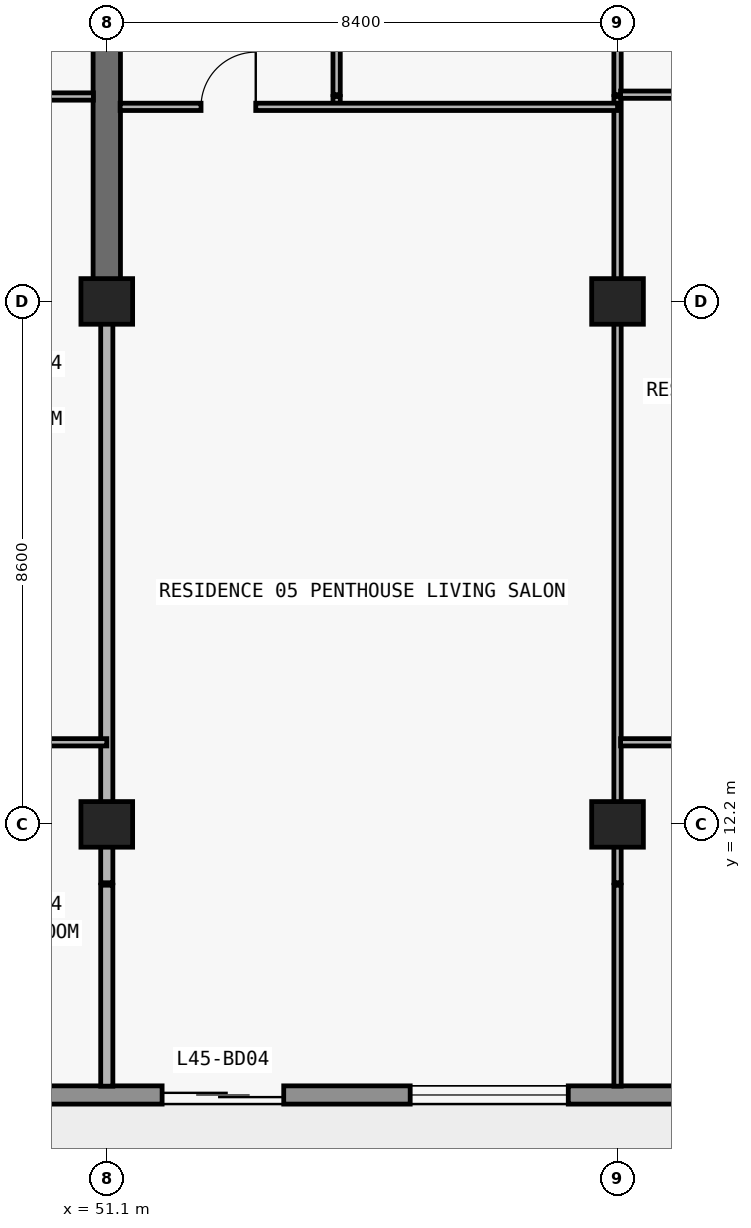
"""IFC4 building model, lengths in metres.
Left out: names, types, materials, properties, quantities, classifications, styles, units other than length and angle.
Written with IfcOpenShell. Run it as: python <this file> out.ifc"""

import sys

from ifc_helpers import new_model, si_unit, direction, frame, frame_2d, origin, origin_2d, place, context, subcontext, project, spatial, rectangle, extrude, element, fill, save


model = new_model("IFC4")
c1 = context("Model", 3, precision=1e-05, world=origin(), true_north=direction((0.0, 1.0)))
c2 = subcontext(c1, "Body", "Model", "MODEL_VIEW")
j1 = project(units=[si_unit("LENGTHUNIT", "METRE"), si_unit("PLANEANGLEUNIT", "RADIAN")], contexts=[c1])
p1 = place(None, origin())
s1 = spatial("IfcSite", under=j1, at=p1, CompositionType="ELEMENT")
p2 = place(p1, origin())
s2 = spatial("IfcBuilding", under=s1, at=p2, CompositionType="ELEMENT")
p3 = place(p2, frame((0.0, 0.0, 163.8)))
s3 = spatial("IfcBuildingStorey", under=s2, at=p3, CompositionType="ELEMENT", Elevation=163.8)
for number, where, z_axis, x_axis in (
    (1, (51.1, 12.2, 0.0), (0.0, 0.0, 1.0), (1.0, 0.0, 0.0)),
    (2, (59.5, 12.2, 0.0), (0.0, 0.0, 1.0), (1.0, 0.0, 0.0)),
    (3, (51.1, 20.8, 0.0), (0.0, 0.0, 1.0), (1.0, 0.0, 0.0)),
    (4, (59.5, 20.8, 0.0), (0.0, 0.0, 1.0), (1.0, 0.0, 0.0)),
):
    element("IfcColumn", number, at=place(p3, frame(where, z_axis=z_axis, x_axis=x_axis)), inside=s3, PredefinedType="COLUMN", context=c2, shape_type="SweptSolid", body=[
        extrude(rectangle(XDim=0.85, YDim=0.75, at=origin_2d()), origin(), (0.0, 0.0, 1.0), 3.05),
    ])
p4 = place(p3, frame((51.1, 20.8, 0.0), z_axis=(0.0, 0.0, 1.0), x_axis=(0.0, 1.0, 0.0)))
e5 = element("IfcWall", 5, at=p4, inside=s3, PredefinedType="SHEAR", context=c2, shape_type="SweptSolid", body=[
    extrude(rectangle(XDim=8.6, YDim=0.45, at=frame_2d((4.3, 0.0))), origin(), (0.0, 0.0, 1.0), 3.05),
])
p5 = place(p3, frame((67.7, 7.75, 0.0), z_axis=(0.0, 0.0, 1.0), x_axis=(-1.0, 0.0, 0.0)))
e6 = element("IfcWall", 6, at=p5, inside=s3, PredefinedType="STANDARD", context=c2, shape_type="SweptSolid", body=[
    extrude(rectangle(XDim=57.6, YDim=0.3, at=frame_2d((28.8, 0.0))), origin(), (0.0, 0.0, 1.0), 3.05),
])
p6 = place(p5, frame((54.69, 0.0, 0.0)))
e7 = element("IfcOpeningElement", 7, at=p6, cuts=e6, PredefinedType="OPENING", context=c2, shape_type="SweptSolid", body=[
    extrude(rectangle(XDim=2.0, YDim=2.3, at=frame_2d((1.0, 1.15))), frame((0.0, 0.16, 0.0), z_axis=(0.0, -1.0, 0.0), x_axis=(1.0, 0.0, 0.0)), (0.0, 0.0, 1.0), 0.32),
])
p7 = place(p5, frame((50.21, 0.0, 0.65)))
e8 = element("IfcOpeningElement", 8, at=p7, cuts=e6, PredefinedType="OPENING", context=c2, shape_type="SweptSolid", body=[
    extrude(rectangle(XDim=2.6, YDim=1.85, at=frame_2d((1.3, 0.925))), frame((0.0, 0.16, 0.0), z_axis=(0.0, -1.0, 0.0), x_axis=(1.0, 0.0, 0.0)), (0.0, 0.0, 1.0), 0.32),
])
p8 = place(p5, frame((44.1, 0.0, 0.85)))
e9 = element("IfcOpeningElement", 9, at=p8, cuts=e6, PredefinedType="OPENING", context=c2, shape_type="SweptSolid", body=[
    extrude(rectangle(XDim=2.2, YDim=1.55, at=frame_2d((1.1, 0.775))), frame((0.0, 0.16, 0.0), z_axis=(0.0, -1.0, 0.0), x_axis=(1.0, 0.0, 0.0)), (0.0, 0.0, 1.0), 0.32),
])
p9 = place(p5, frame((37.69, 0.0, 0.0)))
e10 = element("IfcOpeningElement", 10, at=p9, cuts=e6, PredefinedType="OPENING", context=c2, shape_type="SweptSolid", body=[
    extrude(rectangle(XDim=2.0, YDim=2.3, at=frame_2d((1.0, 1.15))), frame((0.0, 0.16, 0.0), z_axis=(0.0, -1.0, 0.0), x_axis=(1.0, 0.0, 0.0)), (0.0, 0.0, 1.0), 0.32),
])
p10 = place(p5, frame((33.59, 0.0, 0.85)))
e11 = element("IfcOpeningElement", 11, at=p10, cuts=e6, PredefinedType="OPENING", context=c2, shape_type="SweptSolid", body=[
    extrude(rectangle(XDim=1.8, YDim=1.55, at=frame_2d((0.9, 0.775))), frame((0.0, 0.16, 0.0), z_axis=(0.0, -1.0, 0.0), x_axis=(1.0, 0.0, 0.0)), (0.0, 0.0, 1.0), 0.32),
])
p11 = place(p5, frame((25.914, 0.0, 0.85)))
e12 = element("IfcOpeningElement", 12, at=p11, cuts=e6, PredefinedType="OPENING", context=c2, shape_type="SweptSolid", body=[
    extrude(rectangle(XDim=2.2, YDim=1.55, at=frame_2d((1.1, 0.775))), frame((0.0, 0.16, 0.0), z_axis=(0.0, -1.0, 0.0), x_axis=(1.0, 0.0, 0.0)), (0.0, 0.0, 1.0), 0.32),
])
p12 = place(p5, frame((21.69, 0.0, 0.0)))
e13 = element("IfcOpeningElement", 13, at=p12, cuts=e6, PredefinedType="OPENING", context=c2, shape_type="SweptSolid", body=[
    extrude(rectangle(XDim=2.0, YDim=2.3, at=frame_2d((1.0, 1.15))), frame((0.0, 0.16, 0.0), z_axis=(0.0, -1.0, 0.0), x_axis=(1.0, 0.0, 0.0)), (0.0, 0.0, 1.0), 0.32),
])
p13 = place(p5, frame((17.59, 0.0, 0.85)))
e14 = element("IfcOpeningElement", 14, at=p13, cuts=e6, PredefinedType="OPENING", context=c2, shape_type="SweptSolid", body=[
    extrude(rectangle(XDim=1.8, YDim=1.55, at=frame_2d((0.9, 0.775))), frame((0.0, 0.16, 0.0), z_axis=(0.0, -1.0, 0.0), x_axis=(1.0, 0.0, 0.0)), (0.0, 0.0, 1.0), 0.32),
])
p14 = place(p5, frame((13.69, 0.0, 0.0)))
e15 = element("IfcOpeningElement", 15, at=p14, cuts=e6, PredefinedType="OPENING", context=c2, shape_type="SweptSolid", body=[
    extrude(rectangle(XDim=2.0, YDim=2.3, at=frame_2d((1.0, 1.15))), frame((0.0, 0.16, 0.0), z_axis=(0.0, -1.0, 0.0), x_axis=(1.0, 0.0, 0.0)), (0.0, 0.0, 1.0), 0.32),
])
p15 = place(p5, frame((9.01, 0.0, 0.65)))
e16 = element("IfcOpeningElement", 16, at=p15, cuts=e6, PredefinedType="OPENING", context=c2, shape_type="SweptSolid", body=[
    extrude(rectangle(XDim=2.6, YDim=1.85, at=frame_2d((1.3, 0.925))), frame((0.0, 0.16, 0.0), z_axis=(0.0, -1.0, 0.0), x_axis=(1.0, 0.0, 0.0)), (0.0, 0.0, 1.0), 0.32),
])
p16 = place(p5, frame((3.0, 0.0, 0.85)))
e17 = element("IfcOpeningElement", 17, at=p16, cuts=e6, PredefinedType="OPENING", context=c2, shape_type="SweptSolid", body=[
    extrude(rectangle(XDim=2.2, YDim=1.55, at=frame_2d((1.1, 0.775))), frame((0.0, 0.16, 0.0), z_axis=(0.0, -1.0, 0.0), x_axis=(1.0, 0.0, 0.0)), (0.0, 0.0, 1.0), 0.32),
])
p17 = place(p3, frame((51.1, 7.895, 0.0), z_axis=(0.0, 0.0, 1.0), x_axis=(0.0, 1.0, 0.0)))
e18 = element("IfcWall", 18, at=p17, inside=s3, PredefinedType="PARTITIONING", context=c2, shape_type="SweptSolid", body=[
    extrude(rectangle(XDim=3.305, YDim=0.2, at=frame_2d((1.652, 0.0))), origin(), (0.0, 0.0, 1.0), 3.05),
])
p18 = place(p3, frame((51.1, 11.24, 0.0), z_axis=(0.0, 0.0, 1.0), x_axis=(0.0, 1.0, 0.0)))
e19 = element("IfcWall", 19, at=p18, inside=s3, PredefinedType="PARTITIONING", context=c2, shape_type="SweptSolid", body=[
    extrude(rectangle(XDim=9.555, YDim=0.2, at=frame_2d((4.777, 0.0))), origin(), (0.0, 0.0, 1.0), 2.263),
])
p19 = place(p3, frame((54.88, 24.0, 0.0), z_axis=(0.0, 0.0, 1.0), x_axis=(0.0, 1.0, 0.0)))
e20 = element("IfcWall", 20, at=p19, inside=s3, PredefinedType="PARTITIONING", context=c2, shape_type="SweptSolid", body=[
    extrude(rectangle(XDim=0.17, YDim=0.12, at=frame_2d((0.085, 0.0))), origin(), (0.0, 0.0, 1.0), 3.05),
])
p20 = place(p3, frame((54.88, 24.2, 0.0), z_axis=(0.0, 0.0, 1.0), x_axis=(0.0, 1.0, 0.0)))
e21 = element("IfcWall", 21, at=p20, inside=s3, PredefinedType="PARTITIONING", context=c2, shape_type="SweptSolid", body=[
    extrude(rectangle(XDim=4.6, YDim=0.12, at=frame_2d((2.3, 0.0))), origin(), (0.0, 0.0, 1.0), 3.05),
])
p21 = place(p20, frame((1.85, 0.0, 0.0)))
e22 = element("IfcOpeningElement", 22, at=p21, cuts=e21, PredefinedType="OPENING", context=c2, shape_type="SweptSolid", body=[
    extrude(rectangle(XDim=0.9, YDim=2.15, at=frame_2d((0.45, 1.075))), frame((0.0, 0.07, 0.0), z_axis=(0.0, -1.0, 0.0), x_axis=(1.0, 0.0, 0.0)), (0.0, 0.0, 1.0), 0.14),
])
p22 = place(p3, frame((59.5, 7.895, 0.0), z_axis=(0.0, 0.0, 1.0), x_axis=(0.0, 1.0, 0.0)))
e23 = element("IfcWall", 23, at=p22, inside=s3, PredefinedType="PARTITIONING", context=c2, shape_type="SweptSolid", body=[
    extrude(rectangle(XDim=3.305, YDim=0.12, at=frame_2d((1.652, 0.0))), origin(), (0.0, 0.0, 1.0), 3.05),
])
p23 = place(p3, frame((59.5, 11.24, 0.0), z_axis=(0.0, 0.0, 1.0), x_axis=(0.0, 1.0, 0.0)))
e24 = element("IfcWall", 24, at=p23, inside=s3, PredefinedType="PARTITIONING", context=c2, shape_type="SweptSolid", body=[
    extrude(rectangle(XDim=12.93, YDim=0.12, at=frame_2d((6.465, 0.0))), origin(), (0.0, 0.0, 1.0), 2.263),
])
p24 = place(p3, frame((59.5, 24.2, 0.0), z_axis=(0.0, 0.0, 1.0), x_axis=(0.0, 1.0, 0.0)))
e25 = element("IfcWall", 25, at=p24, inside=s3, PredefinedType="PARTITIONING", context=c2, shape_type="SweptSolid", body=[
    extrude(rectangle(XDim=4.84, YDim=0.12, at=frame_2d((2.42, 0.0))), origin(), (0.0, 0.0, 1.0), 2.263),
])
p25 = place(p24, frame((1.75, 0.0, 0.0)))
e26 = element("IfcOpeningElement", 26, at=p25, cuts=e25, PredefinedType="OPENING", context=c2, shape_type="SweptSolid", body=[
    extrude(rectangle(XDim=0.9, YDim=2.15, at=frame_2d((0.45, 1.075))), frame((0.0, 0.07, 0.0), z_axis=(0.0, -1.0, 0.0), x_axis=(1.0, 0.0, 0.0)), (0.0, 0.0, 1.0), 0.14),
])
p26 = place(p3, frame((47.32, 13.55, 0.0), z_axis=(0.0, 0.0, 1.0), x_axis=(1.0, 0.0, 0.0)))
e27 = element("IfcWall", 27, at=p26, inside=s3, PredefinedType="PARTITIONING", context=c2, shape_type="SweptSolid", body=[
    extrude(rectangle(XDim=3.78, YDim=0.12, at=frame_2d((1.89, 0.0))), origin(), (0.0, 0.0, 1.0), 3.05),
])
p27 = place(p26, frame((1.44, 0.0, 0.0)))
e28 = element("IfcOpeningElement", 28, at=p27, cuts=e27, PredefinedType="OPENING", context=c2, shape_type="SweptSolid", body=[
    extrude(rectangle(XDim=0.9, YDim=2.15, at=frame_2d((0.45, 1.075))), frame((0.0, 0.07, 0.0), z_axis=(0.0, -1.0, 0.0), x_axis=(1.0, 0.0, 0.0)), (0.0, 0.0, 1.0), 0.14),
])
p28 = place(p3, frame((59.55, 13.55, 0.0), z_axis=(0.0, 0.0, 1.0), x_axis=(1.0, 0.0, 0.0)))
e29 = element("IfcWall", 29, at=p28, inside=s3, PredefinedType="PARTITIONING", context=c2, shape_type="SweptSolid", body=[
    extrude(rectangle(XDim=8.15, YDim=0.12, at=frame_2d((4.075, 0.0))), origin(), (0.0, 0.0, 1.0), 3.05),
])
p29 = place(p28, frame((3.625, 0.0, 0.0)))
e30 = element("IfcOpeningElement", 30, at=p29, cuts=e29, PredefinedType="OPENING", context=c2, shape_type="SweptSolid", body=[
    extrude(rectangle(XDim=0.9, YDim=2.15, at=frame_2d((0.45, 1.075))), frame((0.0, 0.07, 0.0), z_axis=(0.0, -1.0, 0.0), x_axis=(1.0, 0.0, 0.0)), (0.0, 0.0, 1.0), 0.14),
])
p30 = place(p3, frame((51.32, 24.0, 0.0), z_axis=(0.0, 0.0, 1.0), x_axis=(1.0, 0.0, 0.0)))
e31 = element("IfcWall", 31, at=p30, inside=s3, PredefinedType="PARTITIONING", context=c2, shape_type="SweptSolid", body=[
    extrude(rectangle(XDim=8.18, YDim=0.12, at=frame_2d((4.09, 0.0))), origin(), (0.0, 0.0, 1.0), 3.05),
])
p31 = place(p30, frame((1.33, 0.0, 0.0)))
e32 = element("IfcOpeningElement", 32, at=p31, cuts=e31, PredefinedType="OPENING", context=c2, shape_type="SweptSolid", body=[
    extrude(rectangle(XDim=0.9, YDim=2.15, at=frame_2d((0.45, 1.075))), frame((0.0, 0.07, 0.0), z_axis=(0.0, -1.0, 0.0), x_axis=(1.0, 0.0, 0.0)), (0.0, 0.0, 1.0), 0.14),
])
p32 = place(p3, frame((42.7, 24.17, 0.0), z_axis=(0.0, 0.0, 1.0), x_axis=(1.0, 0.0, 0.0)))
e33 = element("IfcWall", 33, at=p32, inside=s3, PredefinedType="PARTITIONING", context=c2, shape_type="SweptSolid", body=[
    extrude(rectangle(XDim=8.18, YDim=0.12, at=frame_2d((4.09, 0.0))), origin(), (0.0, 0.0, 1.0), 3.05),
])
p33 = place(p32, frame((1.86, 0.0, 0.0)))
e34 = element("IfcOpeningElement", 34, at=p33, cuts=e33, PredefinedType="OPENING", context=c2, shape_type="SweptSolid", body=[
    extrude(rectangle(XDim=0.9, YDim=2.15, at=frame_2d((0.45, 1.075))), frame((0.0, 0.07, 0.0), z_axis=(0.0, -1.0, 0.0), x_axis=(1.0, 0.0, 0.0)), (0.0, 0.0, 1.0), 0.14),
])
p34 = place(p32, frame((6.033, 0.0, 0.0)))
e35 = element("IfcOpeningElement", 35, at=p34, cuts=e33, PredefinedType="OPENING", context=c2, shape_type="SweptSolid", body=[
    extrude(rectangle(XDim=0.9, YDim=2.15, at=frame_2d((0.45, 1.075))), frame((0.0, 0.07, 0.0), z_axis=(0.0, -1.0, 0.0), x_axis=(1.0, 0.0, 0.0)), (0.0, 0.0, 1.0), 0.14),
])
p35 = place(p3, frame((59.55, 24.2, 0.0), z_axis=(0.0, 0.0, 1.0), x_axis=(1.0, 0.0, 0.0)))
e36 = element("IfcWall", 36, at=p35, inside=s3, PredefinedType="PARTITIONING", context=c2, shape_type="SweptSolid", body=[
    extrude(rectangle(XDim=8.15, YDim=0.12, at=frame_2d((4.075, 0.0))), origin(), (0.0, 0.0, 1.0), 3.05),
])
p36 = place(p35, frame((3.625, 0.0, 0.0)))
e37 = element("IfcOpeningElement", 37, at=p36, cuts=e36, PredefinedType="OPENING", context=c2, shape_type="SweptSolid", body=[
    extrude(rectangle(XDim=0.9, YDim=2.15, at=frame_2d((0.45, 1.075))), frame((0.0, 0.07, 0.0), z_axis=(0.0, -1.0, 0.0), x_axis=(1.0, 0.0, 0.0)), (0.0, 0.0, 1.0), 0.14),
])
p37 = place(p14, origin())
e38 = element("IfcDoor", 38, at=p37, inside=s3, OperationType="DOUBLE_DOOR_SLIDING", PredefinedType="DOOR", context=c2, shape_type="SweptSolid", body=[
    extrude(rectangle(XDim=2.0, YDim=2.3, at=frame_2d((1.0, 1.15))), frame((0.0, 0.025, 0.0), z_axis=(0.0, -1.0, 0.0), x_axis=(1.0, 0.0, 0.0)), (0.0, 0.0, 1.0), 0.05),
])
fill(e15, e38)
p38 = place(p15, origin())
e39 = element("IfcWindow", 39, at=p38, inside=s3, PartitioningType="SINGLE_PANEL", PredefinedType="WINDOW", context=c2, shape_type="SweptSolid", body=[
    extrude(rectangle(XDim=2.6, YDim=1.85, at=frame_2d((1.3, 0.925))), frame((0.0, 0.03, 0.0), z_axis=(0.0, -1.0, 0.0), x_axis=(1.0, 0.0, 0.0)), (0.0, 0.0, 1.0), 0.06),
])
fill(e16, e39)
p39 = place(p31, origin())
e40 = element("IfcDoor", 40, at=p39, inside=s3, OperationType="SINGLE_SWING_RIGHT", PredefinedType="DOOR", context=c2, shape_type="SweptSolid", body=[
    extrude(rectangle(XDim=0.9, YDim=2.15, at=frame_2d((0.45, 1.075))), frame((0.0, 0.025, 0.0), z_axis=(0.0, -1.0, 0.0), x_axis=(1.0, 0.0, 0.0)), (0.0, 0.0, 1.0), 0.05),
])
fill(e32, e40)
save(model, sys.argv[1])
